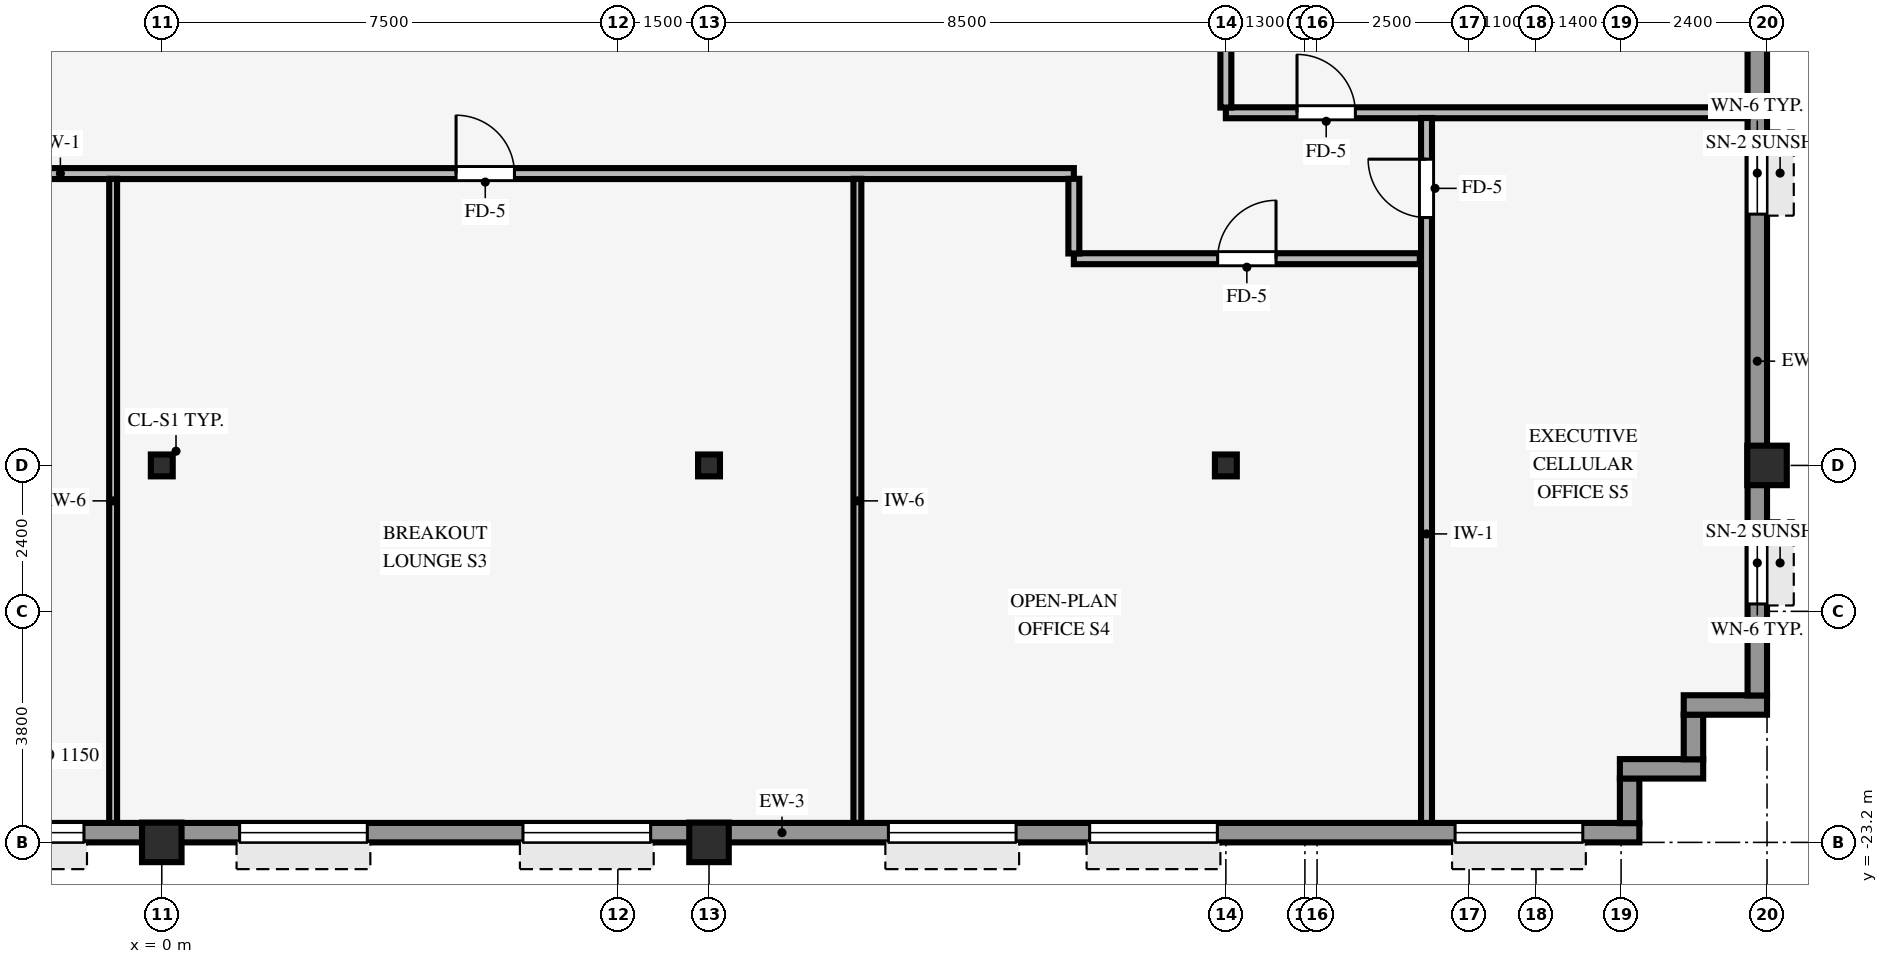
"""IFC4 building model, lengths in metres.
Left out: names, types, materials, properties, quantities, classifications, styles, units other than length and angle.
Written with IfcOpenShell. Run it as: python <this file> out.ifc"""

import sys

from ifc_helpers import new_model, si_unit, direction, frame, frame_2d, origin, origin_2d, place, context, subcontext, project, spatial, rectangle, hollow_rectangle, i_section, extrude, source, transform, mapped, element, fill, save


model = new_model("IFC4")
c1 = context("Model", 3, precision=1e-05, world=origin(), true_north=direction((0.0, 1.0)))
c2 = subcontext(c1, "Body", "Model", "MODEL_VIEW")
j1 = project(units=[si_unit("LENGTHUNIT", "METRE"), si_unit("PLANEANGLEUNIT", "RADIAN")], contexts=[c1])
p1 = place(None, origin())
s1 = spatial("IfcSite", under=j1, at=p1, CompositionType="ELEMENT")
p2 = place(p1, origin())
s2 = spatial("IfcBuilding", under=s1, at=p2, CompositionType="ELEMENT")
p3 = place(p2, frame((0.0, 0.0, 116.55)))
s3 = spatial("IfcBuildingStorey", under=s2, at=p3, CompositionType="ELEMENT", Elevation=116.55)
p4 = place(p3, frame((26.4, -17.0, -0.4), z_axis=(0.0, 0.0, 1.0), x_axis=(1.0, 0.0, 0.0)))
e1 = element("IfcColumn", 1, at=p4, inside=s3, PredefinedType="COLUMN", context=c2, shape_type="SweptSolid", body=[
    extrude(hollow_rectangle(XDim=0.65, YDim=0.65, WallThickness=0.04, InnerFilletRadius=0.04, OuterFilletRadius=0.08, at=origin_2d()), origin(), (0.0, 0.0, 1.0), 3.77),
])
for number, where, z_axis, x_axis in (
    (2, (0.0, -23.2, 0.0), (0.0, 0.0, 1.0), (1.0, 0.0, 0.0)),
    (3, (9.0, -23.2, 0.0), (0.0, 0.0, 1.0), (1.0, 0.0, 0.0)),
):
    element("IfcColumn", number, at=place(p3, frame(where, z_axis=z_axis, x_axis=x_axis)), inside=s3, PredefinedType="COLUMN", context=c2, shape_type="SweptSolid", body=[
        extrude(hollow_rectangle(XDim=0.65, YDim=0.65, WallThickness=0.04, InnerFilletRadius=0.04, OuterFilletRadius=0.08, at=origin_2d()), origin(), (0.0, 0.0, 1.0), 3.37),
    ])
for number, where, z_axis, x_axis in (
    (4, (0.0, -17.0, 0.0), (0.0, 0.0, 1.0), (1.0, 0.0, 0.0)),
    (5, (9.0, -17.0, 0.0), (0.0, 0.0, 1.0), (1.0, 0.0, 0.0)),
    (6, (17.5, -17.0, 0.0), (0.0, 0.0, 1.0), (1.0, 0.0, 0.0)),
):
    element("IfcColumn", number, at=place(p3, frame(where, z_axis=z_axis, x_axis=x_axis)), inside=s3, PredefinedType="COLUMN", context=c2, shape_type="SweptSolid", body=[
        extrude(i_section(OverallWidth=0.36, OverallDepth=0.36, WebThickness=0.021, FlangeThickness=0.021, FilletRadius=0.018, at=origin_2d()), origin(), (0.0, 0.0, 1.0), 3.37),
    ])
p5 = place(p3, frame((-24.3, -23.04, 0.0), z_axis=(0.0, 0.0, 1.0), x_axis=(1.0, 0.0, 0.0)))
e7 = element("IfcWall", 7, at=p5, inside=s3, PredefinedType="STANDARD", context=c2, shape_type="SweptSolid", body=[
    extrude(rectangle(XDim=48.6, YDim=0.32, at=frame_2d((24.3, 0.0))), origin(), (0.0, 0.0, 1.0), 2.705),
])
p6 = place(p5, frame((19.98, 0.0, 0.0), z_axis=(0.0, 0.0, 1.0), x_axis=(-1.0, 0.0, 0.0)))
e8 = element("IfcOpeningElement", 8, at=p6, cuts=e7, PredefinedType="OPENING", context=c2, shape_type="SweptSolid", body=[
    extrude(rectangle(XDim=0.98, YDim=2.15, at=frame_2d((0.49, 1.075))), frame((0.0, 0.17, 0.0), z_axis=(0.0, -1.0, 0.0), x_axis=(1.0, 0.0, 0.0)), (0.0, 0.0, 1.0), 0.34),
])
p7 = place(p5, frame((2.28, 0.0, 0.8)))
e9 = element("IfcOpeningElement", 9, at=p7, cuts=e7, PredefinedType="OPENING", context=c2, shape_type="SweptSolid", body=[
    extrude(rectangle(XDim=2.1, YDim=1.56, at=frame_2d((1.05, 0.78))), frame((0.0, 0.17, 0.0), z_axis=(0.0, -1.0, 0.0), x_axis=(1.0, 0.0, 0.0)), (0.0, 0.0, 1.0), 0.34),
])
p8 = place(p5, frame((6.94, 0.0, 0.8)))
e10 = element("IfcOpeningElement", 10, at=p8, cuts=e7, PredefinedType="OPENING", context=c2, shape_type="SweptSolid", body=[
    extrude(rectangle(XDim=2.1, YDim=1.56, at=frame_2d((1.05, 0.78))), frame((0.0, 0.17, 0.0), z_axis=(0.0, -1.0, 0.0), x_axis=(1.0, 0.0, 0.0)), (0.0, 0.0, 1.0), 0.34),
])
p9 = place(p5, frame((11.6, 0.0, 0.8)))
e11 = element("IfcOpeningElement", 11, at=p9, cuts=e7, PredefinedType="OPENING", context=c2, shape_type="SweptSolid", body=[
    extrude(rectangle(XDim=2.1, YDim=1.56, at=frame_2d((1.05, 0.78))), frame((0.0, 0.17, 0.0), z_axis=(0.0, -1.0, 0.0), x_axis=(1.0, 0.0, 0.0)), (0.0, 0.0, 1.0), 0.34),
])
p10 = place(p5, frame((16.26, 0.0, 0.8)))
e12 = element("IfcOpeningElement", 12, at=p10, cuts=e7, PredefinedType="OPENING", context=c2, shape_type="SweptSolid", body=[
    extrude(rectangle(XDim=2.1, YDim=1.56, at=frame_2d((1.05, 0.78))), frame((0.0, 0.17, 0.0), z_axis=(0.0, -1.0, 0.0), x_axis=(1.0, 0.0, 0.0)), (0.0, 0.0, 1.0), 0.34),
])
p11 = place(p5, frame((20.92, 0.0, 0.8)))
e13 = element("IfcOpeningElement", 13, at=p11, cuts=e7, PredefinedType="OPENING", context=c2, shape_type="SweptSolid", body=[
    extrude(rectangle(XDim=2.1, YDim=1.56, at=frame_2d((1.05, 0.78))), frame((0.0, 0.17, 0.0), z_axis=(0.0, -1.0, 0.0), x_axis=(1.0, 0.0, 0.0)), (0.0, 0.0, 1.0), 0.34),
])
p12 = place(p5, frame((25.58, 0.0, 0.8)))
e14 = element("IfcOpeningElement", 14, at=p12, cuts=e7, PredefinedType="OPENING", context=c2, shape_type="SweptSolid", body=[
    extrude(rectangle(XDim=2.1, YDim=1.56, at=frame_2d((1.05, 0.78))), frame((0.0, 0.17, 0.0), z_axis=(0.0, -1.0, 0.0), x_axis=(1.0, 0.0, 0.0)), (0.0, 0.0, 1.0), 0.34),
])
p13 = place(p5, frame((30.24, 0.0, 0.8)))
e15 = element("IfcOpeningElement", 15, at=p13, cuts=e7, PredefinedType="OPENING", context=c2, shape_type="SweptSolid", body=[
    extrude(rectangle(XDim=2.1, YDim=1.56, at=frame_2d((1.05, 0.78))), frame((0.0, 0.17, 0.0), z_axis=(0.0, -1.0, 0.0), x_axis=(1.0, 0.0, 0.0)), (0.0, 0.0, 1.0), 0.34),
])
p14 = place(p5, frame((36.25, 0.0, 0.8)))
e16 = element("IfcOpeningElement", 16, at=p14, cuts=e7, PredefinedType="OPENING", context=c2, shape_type="SweptSolid", body=[
    extrude(rectangle(XDim=2.1, YDim=1.56, at=frame_2d((1.05, 0.78))), frame((0.0, 0.17, 0.0), z_axis=(0.0, -1.0, 0.0), x_axis=(1.0, 0.0, 0.0)), (0.0, 0.0, 1.0), 0.34),
])
p15 = place(p5, frame((39.56, 0.0, 0.8)))
e17 = element("IfcOpeningElement", 17, at=p15, cuts=e7, PredefinedType="OPENING", context=c2, shape_type="SweptSolid", body=[
    extrude(rectangle(XDim=2.1, YDim=1.56, at=frame_2d((1.05, 0.78))), frame((0.0, 0.17, 0.0), z_axis=(0.0, -1.0, 0.0), x_axis=(1.0, 0.0, 0.0)), (0.0, 0.0, 1.0), 0.34),
])
p16 = place(p5, frame((45.57, 0.0, 0.8)))
e18 = element("IfcOpeningElement", 18, at=p16, cuts=e7, PredefinedType="OPENING", context=c2, shape_type="SweptSolid", body=[
    extrude(rectangle(XDim=2.1, YDim=1.56, at=frame_2d((1.05, 0.78))), frame((0.0, 0.17, 0.0), z_axis=(0.0, -1.0, 0.0), x_axis=(1.0, 0.0, 0.0)), (0.0, 0.0, 1.0), 0.34),
])
p17 = place(p3, frame((24.14, -22.884, 0.0), z_axis=(0.0, 0.0, 1.0), x_axis=(0.0, 1.0, 0.0)))
e19 = element("IfcWall", 19, at=p17, inside=s3, PredefinedType="STANDARD", context=c2, shape_type="SweptSolid", body=[
    extrude(rectangle(XDim=0.738, YDim=0.32, at=frame_2d((0.369, 0.0))), origin(), (0.0, 0.0, 1.0), 3.36),
])
p18 = place(p3, frame((23.98, -21.99, 0.0), z_axis=(0.0, 0.0, 1.0), x_axis=(1.0, 0.0, 0.0)))
e20 = element("IfcWall", 20, at=p18, inside=s3, PredefinedType="STANDARD", context=c2, shape_type="SweptSolid", body=[
    extrude(rectangle(XDim=1.37, YDim=0.32, at=frame_2d((0.685, 0.0))), origin(), (0.0, 0.0, 1.0), 3.36),
])
p19 = place(p3, frame((25.19, -21.834, 0.0), z_axis=(0.0, 0.0, 1.0), x_axis=(0.0, 1.0, 0.0)))
e21 = element("IfcWall", 21, at=p19, inside=s3, PredefinedType="STANDARD", context=c2, shape_type="SweptSolid", body=[
    extrude(rectangle(XDim=0.738, YDim=0.32, at=frame_2d((0.369, 0.0))), origin(), (0.0, 0.0, 1.0), 3.36),
])
p20 = place(p3, frame((25.03, -20.94, 0.0), z_axis=(0.0, 0.0, 1.0), x_axis=(1.0, 0.0, 0.0)))
e22 = element("IfcWall", 22, at=p20, inside=s3, PredefinedType="STANDARD", context=c2, shape_type="SweptSolid", body=[
    extrude(rectangle(XDim=1.37, YDim=0.32, at=frame_2d((0.685, 0.0))), origin(), (0.0, 0.0, 1.0), 3.36),
])
p21 = place(p3, frame((26.24, -20.784, 0.0), z_axis=(0.0, 0.0, 1.0), x_axis=(0.0, 1.0, 0.0)))
e23 = element("IfcWall", 23, at=p21, inside=s3, PredefinedType="STANDARD", context=c2, shape_type="SweptSolid", body=[
    extrude(rectangle(XDim=17.184, YDim=0.32, at=frame_2d((8.592, 0.0))), origin(), (0.0, 0.0, 1.0), 2.705),
])
p22 = place(p21, frame((1.506, 0.0, 0.8)))
e24 = element("IfcOpeningElement", 24, at=p22, cuts=e23, PredefinedType="OPENING", context=c2, shape_type="SweptSolid", body=[
    extrude(rectangle(XDim=1.35, YDim=1.56, at=frame_2d((0.675, 0.78))), frame((0.0, 0.17, 0.0), z_axis=(0.0, -1.0, 0.0), x_axis=(1.0, 0.0, 0.0)), (0.0, 0.0, 1.0), 0.34),
])
p23 = place(p21, frame((7.917, 0.0, 0.8)))
e25 = element("IfcOpeningElement", 25, at=p23, cuts=e23, PredefinedType="OPENING", context=c2, shape_type="SweptSolid", body=[
    extrude(rectangle(XDim=1.35, YDim=1.56, at=frame_2d((0.675, 0.78))), frame((0.0, 0.17, 0.0), z_axis=(0.0, -1.0, 0.0), x_axis=(1.0, 0.0, 0.0)), (0.0, 0.0, 1.0), 0.34),
])
p24 = place(p21, frame((12.978, 0.0, 0.8)))
e26 = element("IfcOpeningElement", 26, at=p24, cuts=e23, PredefinedType="OPENING", context=c2, shape_type="SweptSolid", body=[
    extrude(rectangle(XDim=1.35, YDim=1.56, at=frame_2d((0.675, 0.78))), frame((0.0, 0.17, 0.0), z_axis=(0.0, -1.0, 0.0), x_axis=(1.0, 0.0, 0.0)), (0.0, 0.0, 1.0), 0.34),
])
p25 = place(p3, frame((15.0, -13.6, 0.0), z_axis=(0.0, 0.0, 1.0), x_axis=(1.0, 0.0, 0.0)))
e27 = element("IfcWall", 27, at=p25, inside=s3, PredefinedType="PARTITIONING", context=c2, shape_type="SweptSolid", body=[
    extrude(rectangle(XDim=5.69, YDim=0.18, at=frame_2d((2.845, 0.0))), origin(), (0.0, 0.0, 1.0), 2.998),
])
p26 = place(p25, frame((2.365, 0.0, 0.0)))
e28 = element("IfcOpeningElement", 28, at=p26, cuts=e27, PredefinedType="OPENING", context=c2, shape_type="SweptSolid", body=[
    extrude(rectangle(XDim=0.96, YDim=2.1, at=frame_2d((0.48, 1.05))), frame((0.0, 0.1, 0.0), z_axis=(0.0, -1.0, 0.0), x_axis=(1.0, 0.0, 0.0)), (0.0, 0.0, 1.0), 0.2),
])
p27 = place(p3, frame((-15.0, -12.2, 0.0), z_axis=(0.0, 0.0, 1.0), x_axis=(1.0, 0.0, 0.0)))
e29 = element("IfcWall", 29, at=p27, inside=s3, PredefinedType="PARTITIONING", context=c2, shape_type="SweptSolid", body=[
    extrude(rectangle(XDim=30.0, YDim=0.18, at=frame_2d((15.0, 0.0))), origin(), (0.0, 0.0, 1.0), 3.36),
])
p28 = place(p27, frame((19.84, 0.0, 0.0)))
e30 = element("IfcOpeningElement", 30, at=p28, cuts=e29, PredefinedType="OPENING", context=c2, shape_type="SweptSolid", body=[
    extrude(rectangle(XDim=0.96, YDim=2.1, at=frame_2d((0.48, 1.05))), frame((0.0, 0.1, 0.0), z_axis=(0.0, -1.0, 0.0), x_axis=(1.0, 0.0, 0.0)), (0.0, 0.0, 1.0), 0.2),
])
p29 = place(p27, frame((5.865, 0.0, 0.0)))
e31 = element("IfcOpeningElement", 31, at=p29, cuts=e29, PredefinedType="OPENING", context=c2, shape_type="SweptSolid", body=[
    extrude(rectangle(XDim=0.96, YDim=2.1, at=frame_2d((0.48, 1.05))), frame((0.0, 0.1, 0.0), z_axis=(0.0, -1.0, 0.0), x_axis=(1.0, 0.0, 0.0)), (0.0, 0.0, 1.0), 0.2),
])
p30 = place(p3, frame((17.5, -11.2, 0.0), z_axis=(0.0, 0.0, 1.0), x_axis=(1.0, 0.0, 0.0)))
e32 = element("IfcWall", 32, at=p30, inside=s3, PredefinedType="PARTITIONING", context=c2, shape_type="SweptSolid", body=[
    extrude(rectangle(XDim=8.58, YDim=0.18, at=frame_2d((4.29, 0.0))), origin(), (0.0, 0.0, 1.0), 3.36),
])
p31 = place(p30, frame((1.17, 0.0, 0.0)))
e33 = element("IfcOpeningElement", 33, at=p31, cuts=e32, PredefinedType="OPENING", context=c2, shape_type="SweptSolid", body=[
    extrude(rectangle(XDim=0.96, YDim=2.1, at=frame_2d((0.48, 1.05))), frame((0.0, 0.1, 0.0), z_axis=(0.0, -1.0, 0.0), x_axis=(1.0, 0.0, 0.0)), (0.0, 0.0, 1.0), 0.2),
])
for number, where, z_axis, x_axis in (
    (34, (-0.8, -22.88, 0.0), (0.0, 0.0, 1.0), (0.0, 1.0, 0.0)),
    (35, (11.44, -22.88, 0.0), (0.0, 0.0, 1.0), (0.0, 1.0, 0.0)),
):
    element("IfcWall", number, at=place(p3, frame(where, z_axis=z_axis, x_axis=x_axis)), inside=s3, PredefinedType="PARTITIONING", context=c2, shape_type="SweptSolid", body=[
        extrude(rectangle(XDim=10.594, YDim=0.13, at=frame_2d((5.297, 0.0))), origin(), (0.0, 0.0, 1.0), 3.36),
    ])
p32 = place(p3, frame((15.0, -13.514, 0.0), z_axis=(0.0, 0.0, 1.0), x_axis=(0.0, 1.0, 0.0)))
e36 = element("IfcWall", 36, at=p32, inside=s3, PredefinedType="PARTITIONING", context=c2, shape_type="SweptSolid", body=[
    extrude(rectangle(XDim=1.228, YDim=0.18, at=frame_2d((0.614, 0.0))), origin(), (0.0, 0.0, 1.0), 3.36),
])
p33 = place(p3, frame((17.5, -11.114, 0.0), z_axis=(0.0, 0.0, 1.0), x_axis=(0.0, 1.0, 0.0)))
e37 = element("IfcWall", 37, at=p33, inside=s3, PredefinedType="PARTITIONING", context=c2, shape_type="SweptSolid", body=[
    extrude(rectangle(XDim=0.968, YDim=0.18, at=frame_2d((0.484, 0.0))), origin(), (0.0, 0.0, 1.0), 2.738),
])
p34 = place(p3, frame((20.8, -22.88, 0.0), z_axis=(0.0, 0.0, 1.0), x_axis=(0.0, 1.0, 0.0)))
e38 = element("IfcWall", 38, at=p34, inside=s3, PredefinedType="PARTITIONING", context=c2, shape_type="SweptSolid", body=[
    extrude(rectangle(XDim=11.594, YDim=0.18, at=frame_2d((5.797, 0.0))), origin(), (0.0, 0.0, 1.0), 3.36),
])
p35 = place(p34, frame((9.957, 0.0, 0.0)))
e39 = element("IfcOpeningElement", 39, at=p35, cuts=e38, PredefinedType="OPENING", context=c2, shape_type="SweptSolid", body=[
    extrude(rectangle(XDim=0.96, YDim=2.1, at=frame_2d((0.48, 1.05))), frame((0.0, 0.1, 0.0), z_axis=(0.0, -1.0, 0.0), x_axis=(1.0, 0.0, 0.0)), (0.0, 0.0, 1.0), 0.2),
])
m1 = source(origin(), c2, "Body", "SweptSolid", [
    extrude(rectangle(XDim=2.1, YDim=1.56, at=frame_2d((1.05, 0.78))), frame((0.0, 0.03, 0.0), z_axis=(0.0, -1.0, 0.0), x_axis=(1.0, 0.0, 0.0)), (0.0, 0.0, 1.0), 0.06),
])
p36 = place(p11, origin())
e40 = element("IfcWindow", 40, at=p36, inside=s3, PartitioningType="SINGLE_PANEL", PredefinedType="WINDOW", context=c2, shape_type="MappedRepresentation", body=[
    mapped(m1, transform((0.0, 0.0, 0.0), scale=1.0)),
])
fill(e13, e40)
p37 = place(p12, origin())
e41 = element("IfcWindow", 41, at=p37, inside=s3, PartitioningType="SINGLE_PANEL", PredefinedType="WINDOW", context=c2, shape_type="MappedRepresentation", body=[
    mapped(m1, transform((0.0, 0.0, 0.0), scale=1.0)),
])
fill(e14, e41)
p38 = place(p13, origin())
e42 = element("IfcWindow", 42, at=p38, inside=s3, PartitioningType="SINGLE_PANEL", PredefinedType="WINDOW", context=c2, shape_type="MappedRepresentation", body=[
    mapped(m1, transform((0.0, 0.0, 0.0), scale=1.0)),
])
fill(e15, e42)
p39 = place(p14, origin())
e43 = element("IfcWindow", 43, at=p39, inside=s3, PartitioningType="SINGLE_PANEL", PredefinedType="WINDOW", context=c2, shape_type="MappedRepresentation", body=[
    mapped(m1, transform((0.0, 0.0, 0.0), scale=1.0)),
])
fill(e16, e43)
p40 = place(p15, origin())
e44 = element("IfcWindow", 44, at=p40, inside=s3, PartitioningType="SINGLE_PANEL", PredefinedType="WINDOW", context=c2, shape_type="MappedRepresentation", body=[
    mapped(m1, transform((0.0, 0.0, 0.0), scale=1.0)),
])
fill(e17, e44)
p41 = place(p16, origin())
e45 = element("IfcWindow", 45, at=p41, inside=s3, PartitioningType="SINGLE_PANEL", PredefinedType="WINDOW", context=c2, shape_type="MappedRepresentation", body=[
    mapped(m1, transform((0.0, 0.0, 0.0), scale=1.0)),
])
fill(e18, e45)
m2 = source(origin(), c2, "Body", "SweptSolid", [
    extrude(rectangle(XDim=1.35, YDim=1.56, at=frame_2d((0.675, 0.78))), frame((0.0, 0.03, 0.0), z_axis=(0.0, -1.0, 0.0), x_axis=(1.0, 0.0, 0.0)), (0.0, 0.0, 1.0), 0.06),
])
p42 = place(p22, origin())
e46 = element("IfcWindow", 46, at=p42, inside=s3, PartitioningType="SINGLE_PANEL", PredefinedType="WINDOW", context=c2, shape_type="MappedRepresentation", body=[
    mapped(m2, transform((0.0, 0.0, 0.0), scale=1.0)),
])
fill(e24, e46)
p43 = place(p23, origin())
e47 = element("IfcWindow", 47, at=p43, inside=s3, PartitioningType="SINGLE_PANEL", PredefinedType="WINDOW", context=c2, shape_type="MappedRepresentation", body=[
    mapped(m2, transform((0.0, 0.0, 0.0), scale=1.0)),
])
fill(e25, e47)
m3 = source(origin(), c2, "Body", "SweptSolid", [
    extrude(rectangle(XDim=0.96, YDim=2.1, at=frame_2d((0.48, 1.05))), frame((0.0, 0.025, 0.0), z_axis=(0.0, -1.0, 0.0), x_axis=(1.0, 0.0, 0.0)), (0.0, 0.0, 1.0), 0.05),
])
p44 = place(p28, origin())
e48 = element("IfcDoor", 48, at=p44, inside=s3, OperationType="SINGLE_SWING_LEFT", PredefinedType="DOOR", context=c2, shape_type="MappedRepresentation", body=[
    mapped(m3, transform((0.0, 0.0, 0.0), scale=1.0)),
])
fill(e30, e48)
p45 = place(p26, origin())
e49 = element("IfcDoor", 49, at=p45, inside=s3, OperationType="SINGLE_SWING_RIGHT", PredefinedType="DOOR", context=c2, shape_type="MappedRepresentation", body=[
    mapped(m3, transform((0.0, 0.0, 0.0), scale=1.0)),
])
fill(e28, e49)
p46 = place(p31, origin())
e50 = element("IfcDoor", 50, at=p46, inside=s3, OperationType="SINGLE_SWING_LEFT", PredefinedType="DOOR", context=c2, shape_type="MappedRepresentation", body=[
    mapped(m3, transform((0.0, 0.0, 0.0), scale=1.0)),
])
fill(e33, e50)
p47 = place(p35, origin())
e51 = element("IfcDoor", 51, at=p47, inside=s3, OperationType="SINGLE_SWING_RIGHT", PredefinedType="DOOR", context=c2, shape_type="MappedRepresentation", body=[
    mapped(m3, transform((0.0, 0.0, 0.0), scale=1.0)),
])
fill(e39, e51)
save(model, sys.argv[1])
